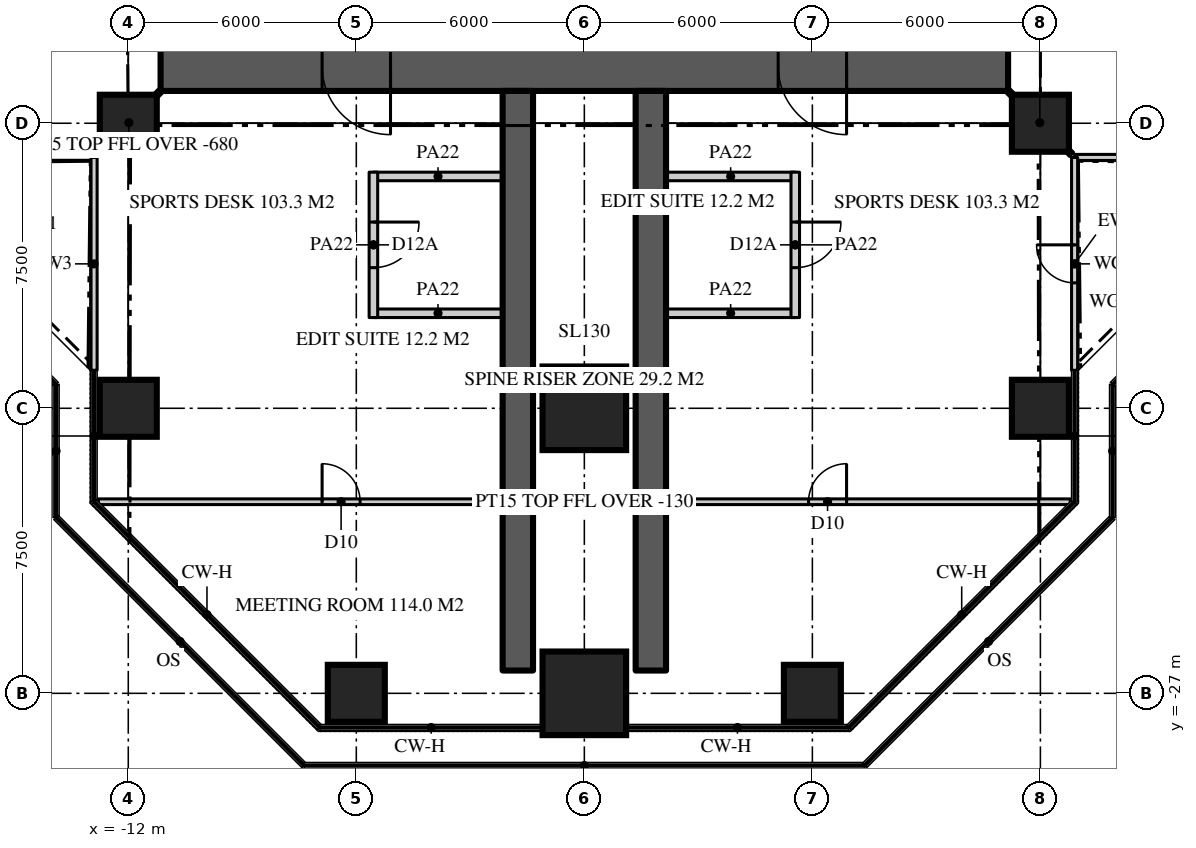
"""IFC4 building model, lengths in metres.
Left out: names, types, materials, properties, quantities, classifications, styles, units other than length and angle.
Written with IfcOpenShell. Run it as: python <this file> out.ifc"""

import sys

from ifc_helpers import new_model, si_unit, direction, frame, frame_2d, origin, origin_2d, place, context, subcontext, project, spatial, rectangle, extrude, element, fill, save


model = new_model("IFC4")
c1 = context("Model", 3, precision=1e-05, world=origin(), true_north=direction((0.0, 1.0)))
c2 = subcontext(c1, "Body", "Model", "MODEL_VIEW")
j1 = project(units=[si_unit("LENGTHUNIT", "METRE"), si_unit("PLANEANGLEUNIT", "RADIAN")], contexts=[c1])
p1 = place(None, origin())
s1 = spatial("IfcSite", under=j1, at=p1, CompositionType="ELEMENT")
p2 = place(p1, origin())
s2 = spatial("IfcBuilding", under=s1, at=p2, CompositionType="ELEMENT")
p3 = place(p2, frame((0.0, 0.0, 216.6)))
s3 = spatial("IfcBuildingStorey", under=s2, at=p3, CompositionType="ELEMENT", Elevation=216.6)
p4 = place(p3, frame((11.15, -10.5, 0.0), z_axis=(0.0, 0.0, 1.0), x_axis=(-1.0, 0.0, 0.0)))
e1 = element("IfcWall", 1, at=p4, inside=s3, PredefinedType="SHEAR", context=c2, shape_type="SweptSolid", body=[
    extrude(rectangle(XDim=22.3, YDim=1.3, at=frame_2d((11.15, 0.0))), origin(), (0.0, 0.0, 1.0), 3.9),
])
p5 = place(p4, frame((16.25, 0.0, 0.0)))
e2 = element("IfcOpeningElement", 2, at=p5, cuts=e1, PredefinedType="OPENING", context=c2, shape_type="SweptSolid", body=[
    extrude(rectangle(XDim=1.8, YDim=2.2, at=frame_2d((0.9, 1.1))), frame((0.0, 0.66, 0.0), z_axis=(0.0, -1.0, 0.0), x_axis=(1.0, 0.0, 0.0)), (0.0, 0.0, 1.0), 1.32),
])
p6 = place(p4, frame((4.25, 0.0, 0.0)))
e3 = element("IfcOpeningElement", 3, at=p6, cuts=e1, PredefinedType="OPENING", context=c2, shape_type="SweptSolid", body=[
    extrude(rectangle(XDim=1.8, YDim=2.2, at=frame_2d((0.9, 1.1))), frame((0.0, 0.66, 0.0), z_axis=(0.0, -1.0, 0.0), x_axis=(1.0, 0.0, 0.0)), (0.0, 0.0, 1.0), 1.32),
])
for number, where, z_axis, x_axis in (
    (4, (-1.75, -11.15, 0.0), (0.0, 0.0, 1.0), (0.0, -1.0, 0.0)),
    (5, (1.75, -11.15, 0.0), (0.0, 0.0, 1.0), (0.0, -1.0, 0.0)),
):
    element("IfcWall", number, at=place(p3, frame(where, z_axis=z_axis, x_axis=x_axis)), inside=s3, PredefinedType="SHEAR", context=c2, shape_type="SweptSolid", body=[
        extrude(rectangle(XDim=15.25, YDim=0.8, at=frame_2d((7.625, 0.0))), origin(), (0.0, 0.0, 1.0), 3.9),
    ])
p7 = place(p3, frame((-6.0, -27.0, 0.0), z_axis=(0.0, 0.0, 1.0), x_axis=(1.0, 0.0, 0.0)))
e6 = element("IfcColumn", 6, at=p7, inside=s3, PredefinedType="COLUMN", context=c2, shape_type="SweptSolid", body=[
    extrude(rectangle(XDim=1.5, YDim=1.5, at=origin_2d()), origin(), (0.0, 0.0, 1.0), 3.9),
])
p8 = place(p3, frame((0.0, -27.0, 0.0), z_axis=(0.0, 0.0, 1.0), x_axis=(1.0, 0.0, 0.0)))
e7 = element("IfcColumn", 7, at=p8, inside=s3, PredefinedType="COLUMN", context=c2, shape_type="SweptSolid", body=[
    extrude(rectangle(XDim=2.2, YDim=2.2, at=origin_2d()), origin(), (0.0, 0.0, 1.0), 3.9),
])
for number, where, z_axis, x_axis in (
    (8, (6.0, -27.0, 0.0), (0.0, 0.0, 1.0), (1.0, 0.0, 0.0)),
    (9, (-12.0, -19.5, 0.0), (0.0, 0.0, 1.0), (1.0, 0.0, 0.0)),
):
    element("IfcColumn", number, at=place(p3, frame(where, z_axis=z_axis, x_axis=x_axis)), inside=s3, PredefinedType="COLUMN", context=c2, shape_type="SweptSolid", body=[
        extrude(rectangle(XDim=1.5, YDim=1.5, at=origin_2d()), origin(), (0.0, 0.0, 1.0), 3.9),
    ])
p9 = place(p3, frame((0.0, -19.5, 0.0), z_axis=(0.0, 0.0, 1.0), x_axis=(1.0, 0.0, 0.0)))
e10 = element("IfcColumn", 10, at=p9, inside=s3, PredefinedType="COLUMN", context=c2, shape_type="SweptSolid", body=[
    extrude(rectangle(XDim=2.2, YDim=2.2, at=origin_2d()), origin(), (0.0, 0.0, 1.0), 3.9),
])
for number, where, z_axis, x_axis in (
    (11, (12.0, -19.5, 0.0), (0.0, 0.0, 1.0), (1.0, 0.0, 0.0)),
    (12, (-12.0, -12.0, 0.0), (0.0, 0.0, 1.0), (1.0, 0.0, 0.0)),
    (13, (12.0, -12.0, 0.0), (0.0, 0.0, 1.0), (1.0, 0.0, 0.0)),
):
    element("IfcColumn", number, at=place(p3, frame(where, z_axis=z_axis, x_axis=x_axis)), inside=s3, PredefinedType="COLUMN", context=c2, shape_type="SweptSolid", body=[
        extrude(rectangle(XDim=1.5, YDim=1.5, at=origin_2d()), origin(), (0.0, 0.0, 1.0), 3.9),
    ])
p10 = place(p3, frame((12.9, -12.9, 0.0), z_axis=(0.0, 0.0, 1.0), x_axis=(1.0, 0.0, 0.0)))
e14 = element("IfcWall", 14, at=p10, inside=s3, PredefinedType="SOLIDWALL", context=c2, shape_type="SweptSolid", body=[
    extrude(rectangle(XDim=5.6, YDim=0.16, at=frame_2d((2.8, 0.0))), origin(), (0.0, 0.0, 1.0), 3.77),
])
p11 = place(p3, frame((-18.5, -12.9, 0.0), z_axis=(0.0, 0.0, 1.0), x_axis=(1.0, 0.0, 0.0)))
e15 = element("IfcWall", 15, at=p11, inside=s3, PredefinedType="SOLIDWALL", context=c2, shape_type="SweptSolid", body=[
    extrude(rectangle(XDim=5.6, YDim=0.16, at=frame_2d((2.8, 0.0))), origin(), (0.0, 0.0, 1.0), 3.77),
])
p12 = place(p11, frame((2.3, 0.0, 0.0)))
e16 = element("IfcOpeningElement", 16, at=p12, cuts=e15, PredefinedType="OPENING", context=c2, shape_type="SweptSolid", body=[
    extrude(rectangle(XDim=1.0, YDim=2.2, at=frame_2d((0.5, 1.1))), frame((0.0, 0.09, 0.0), z_axis=(0.0, -1.0, 0.0), x_axis=(1.0, 0.0, 0.0)), (0.0, 0.0, 1.0), 0.18),
])
p13 = place(p3, frame((-12.9, -12.9, 0.0), z_axis=(0.0, 0.0, 1.0), x_axis=(0.0, -1.0, 0.0)))
e17 = element("IfcWall", 17, at=p13, inside=s3, PredefinedType="SOLIDWALL", context=c2, shape_type="SweptSolid", body=[
    extrude(rectangle(XDim=5.6, YDim=0.16, at=frame_2d((2.8, 0.0))), origin(), (0.0, 0.0, 1.0), 3.77),
])
p14 = place(p3, frame((12.9, -18.5, 0.0), z_axis=(0.0, 0.0, 1.0), x_axis=(0.0, 1.0, 0.0)))
e18 = element("IfcWall", 18, at=p14, inside=s3, PredefinedType="SOLIDWALL", context=c2, shape_type="SweptSolid", body=[
    extrude(rectangle(XDim=5.6, YDim=0.16, at=frame_2d((2.8, 0.0))), origin(), (0.0, 0.0, 1.0), 3.77),
])
p15 = place(p14, frame((2.3, 0.0, 0.0)))
e19 = element("IfcOpeningElement", 19, at=p15, cuts=e18, PredefinedType="OPENING", context=c2, shape_type="SweptSolid", body=[
    extrude(rectangle(XDim=1.0, YDim=2.2, at=frame_2d((0.5, 1.1))), frame((0.0, 0.09, 0.0), z_axis=(0.0, -1.0, 0.0), x_axis=(1.0, 0.0, 0.0)), (0.0, 0.0, 1.0), 0.18),
])
p16 = place(p3, frame((-12.786, -21.959, 0.0), z_axis=(0.0, 0.0, 1.0), x_axis=(1.0, 0.0, 0.0)))
e20 = element("IfcWall", 20, at=p16, inside=s3, PredefinedType="PARTITIONING", context=c2, shape_type="SweptSolid", body=[
    extrude(rectangle(XDim=25.573, YDim=0.15, at=frame_2d((12.786, 0.0))), origin(), (0.0, 0.0, 1.0), 3.77),
])
p17 = place(p16, frame((18.687, 0.0, 0.0)))
e21 = element("IfcOpeningElement", 21, at=p17, cuts=e20, PredefinedType="OPENING", context=c2, shape_type="SweptSolid", body=[
    extrude(rectangle(XDim=1.0, YDim=2.2, at=frame_2d((0.5, 1.1))), frame((0.0, 0.085, 0.0), z_axis=(0.0, -1.0, 0.0), x_axis=(1.0, 0.0, 0.0)), (0.0, 0.0, 1.0), 0.17),
])
p18 = place(p16, frame((5.886, 0.0, 0.0)))
e22 = element("IfcOpeningElement", 22, at=p18, cuts=e20, PredefinedType="OPENING", context=c2, shape_type="SweptSolid", body=[
    extrude(rectangle(XDim=1.0, YDim=2.2, at=frame_2d((0.5, 1.1))), frame((0.0, 0.085, 0.0), z_axis=(0.0, -1.0, 0.0), x_axis=(1.0, 0.0, 0.0)), (0.0, 0.0, 1.0), 0.17),
])
for number, where, z_axis, x_axis in (
    (23, (2.15, -13.4, 0.0), (0.0, 0.0, 1.0), (1.0, 0.0, 0.0)),
    (24, (2.15, -17.0, 0.0), (0.0, 0.0, 1.0), (1.0, 0.0, 0.0)),
):
    element("IfcWall", number, at=place(p3, frame(where, z_axis=z_axis, x_axis=x_axis)), inside=s3, PredefinedType="PARTITIONING", context=c2, shape_type="SweptSolid", body=[
        extrude(rectangle(XDim=3.4, YDim=0.225, at=frame_2d((1.7, 0.0))), origin(), (0.0, 0.0, 1.0), 3.77),
    ])
p19 = place(p3, frame((5.55, -13.288, 0.0), z_axis=(0.0, 0.0, 1.0), x_axis=(0.0, -1.0, 0.0)))
e25 = element("IfcWall", 25, at=p19, inside=s3, PredefinedType="PARTITIONING", context=c2, shape_type="SweptSolid", body=[
    extrude(rectangle(XDim=3.825, YDim=0.225, at=frame_2d((1.913, 0.0))), origin(), (0.0, 0.0, 1.0), 3.77),
])
p20 = place(p19, frame((1.312, 0.0, 0.0)))
e26 = element("IfcOpeningElement", 26, at=p20, cuts=e25, PredefinedType="OPENING", context=c2, shape_type="SweptSolid", body=[
    extrude(rectangle(XDim=1.2, YDim=2.2, at=frame_2d((0.6, 1.1))), frame((0.0, 0.123, 0.0), z_axis=(0.0, -1.0, 0.0), x_axis=(1.0, 0.0, 0.0)), (0.0, 0.0, 1.0), 0.245),
])
for number, where, z_axis, x_axis in (
    (27, (-2.15, -13.4, 0.0), (0.0, 0.0, 1.0), (-1.0, 0.0, 0.0)),
    (28, (-2.15, -17.0, 0.0), (0.0, 0.0, 1.0), (-1.0, 0.0, 0.0)),
):
    element("IfcWall", number, at=place(p3, frame(where, z_axis=z_axis, x_axis=x_axis)), inside=s3, PredefinedType="PARTITIONING", context=c2, shape_type="SweptSolid", body=[
        extrude(rectangle(XDim=3.4, YDim=0.225, at=frame_2d((1.7, 0.0))), origin(), (0.0, 0.0, 1.0), 3.77),
    ])
p21 = place(p3, frame((-5.55, -13.288, 0.0), z_axis=(0.0, 0.0, 1.0), x_axis=(0.0, -1.0, 0.0)))
e29 = element("IfcWall", 29, at=p21, inside=s3, PredefinedType="PARTITIONING", context=c2, shape_type="SweptSolid", body=[
    extrude(rectangle(XDim=3.825, YDim=0.225, at=frame_2d((1.913, 0.0))), origin(), (0.0, 0.0, 1.0), 3.77),
])
p22 = place(p21, frame((1.312, 0.0, 0.0)))
e30 = element("IfcOpeningElement", 30, at=p22, cuts=e29, PredefinedType="OPENING", context=c2, shape_type="SweptSolid", body=[
    extrude(rectangle(XDim=1.2, YDim=2.2, at=frame_2d((0.6, 1.1))), frame((0.0, 0.123, 0.0), z_axis=(0.0, -1.0, 0.0), x_axis=(1.0, 0.0, 0.0)), (0.0, 0.0, 1.0), 0.245),
])
for number, where, z_axis, x_axis in (
    (31, (-11.15, -11.15, 0.0), (0.0, 0.0, 1.0), (-0.707, -0.707, 0.0)),
    (32, (11.15, -11.15, 0.0), (0.0, 0.0, 1.0), (0.707, -0.707, 0.0)),
):
    element("IfcWall", number, at=place(p3, frame(where, z_axis=z_axis, x_axis=x_axis)), inside=s3, PredefinedType="PARTITIONING", context=c2, shape_type="SweptSolid", body=[
        extrude(rectangle(XDim=2.362, YDim=0.15, at=frame_2d((1.181, 0.0))), origin(), (0.0, 0.0, 1.0), 3.22),
    ])
p23 = place(p15, origin())
e33 = element("IfcDoor", 33, at=p23, inside=s3, OperationType="SINGLE_SWING_RIGHT", PredefinedType="DOOR", context=c2, shape_type="SweptSolid", body=[
    extrude(rectangle(XDim=1.0, YDim=2.2, at=frame_2d((0.5, 1.1))), frame((0.0, 0.025, 0.0), z_axis=(0.0, -1.0, 0.0), x_axis=(1.0, 0.0, 0.0)), (0.0, 0.0, 1.0), 0.05),
])
fill(e19, e33)
p24 = place(p5, origin())
e34 = element("IfcDoor", 34, at=p24, inside=s3, OperationType="DOUBLE_DOOR_DOUBLE_SWING", PredefinedType="DOOR", context=c2, shape_type="SweptSolid", body=[
    extrude(rectangle(XDim=1.8, YDim=2.2, at=frame_2d((0.9, 1.1))), frame((0.0, 0.025, 0.0), z_axis=(0.0, -1.0, 0.0), x_axis=(1.0, 0.0, 0.0)), (0.0, 0.0, 1.0), 0.05),
])
fill(e2, e34)
p25 = place(p6, origin())
e35 = element("IfcDoor", 35, at=p25, inside=s3, OperationType="DOUBLE_DOOR_DOUBLE_SWING", PredefinedType="DOOR", context=c2, shape_type="SweptSolid", body=[
    extrude(rectangle(XDim=1.8, YDim=2.2, at=frame_2d((0.9, 1.1))), frame((0.0, 0.025, 0.0), z_axis=(0.0, -1.0, 0.0), x_axis=(1.0, 0.0, 0.0)), (0.0, 0.0, 1.0), 0.05),
])
fill(e3, e35)
p26 = place(p17, origin())
e36 = element("IfcDoor", 36, at=p26, inside=s3, OperationType="SINGLE_SWING_RIGHT", PredefinedType="DOOR", context=c2, shape_type="SweptSolid", body=[
    extrude(rectangle(XDim=1.0, YDim=2.2, at=frame_2d((0.5, 1.1))), frame((0.0, 0.025, 0.0), z_axis=(0.0, -1.0, 0.0), x_axis=(1.0, 0.0, 0.0)), (0.0, 0.0, 1.0), 0.05),
])
fill(e21, e36)
p27 = place(p18, origin())
e37 = element("IfcDoor", 37, at=p27, inside=s3, OperationType="SINGLE_SWING_LEFT", PredefinedType="DOOR", context=c2, shape_type="SweptSolid", body=[
    extrude(rectangle(XDim=1.0, YDim=2.2, at=frame_2d((0.5, 1.1))), frame((0.0, 0.025, 0.0), z_axis=(0.0, -1.0, 0.0), x_axis=(1.0, 0.0, 0.0)), (0.0, 0.0, 1.0), 0.05),
])
fill(e22, e37)
p28 = place(p20, origin())
e38 = element("IfcDoor", 38, at=p28, inside=s3, OperationType="SINGLE_SWING_LEFT", PredefinedType="DOOR", context=c2, shape_type="SweptSolid", body=[
    extrude(rectangle(XDim=1.2, YDim=2.2, at=frame_2d((0.6, 1.1))), frame((0.0, 0.025, 0.0), z_axis=(0.0, -1.0, 0.0), x_axis=(1.0, 0.0, 0.0)), (0.0, 0.0, 1.0), 0.05),
])
fill(e26, e38)
p29 = place(p22, origin())
e39 = element("IfcDoor", 39, at=p29, inside=s3, OperationType="SINGLE_SWING_LEFT", PredefinedType="DOOR", context=c2, shape_type="SweptSolid", body=[
    extrude(rectangle(XDim=1.2, YDim=2.2, at=frame_2d((0.6, 1.1))), frame((0.0, 0.025, 0.0), z_axis=(0.0, -1.0, 0.0), x_axis=(1.0, 0.0, 0.0)), (0.0, 0.0, 1.0), 0.05),
])
fill(e30, e39)
save(model, sys.argv[1])
